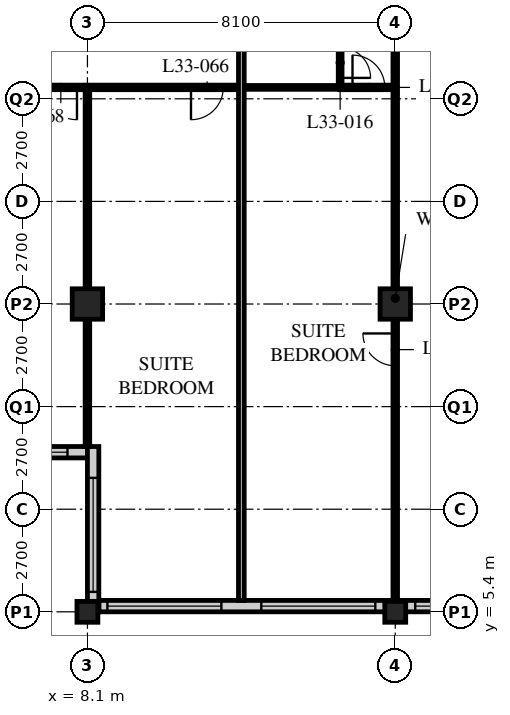
"""IFC4 building model, lengths in metres.
Left out: names, types, materials, properties, quantities, classifications, styles, units other than length and angle.
Written with IfcOpenShell. Run it as: python <this file> out.ifc"""

import sys

from ifc_helpers import new_model, si_unit, direction, frame, frame_2d, origin, origin_2d, place, context, subcontext, project, spatial, rectangle, hollow_rectangle, extrude, element, fill, save


model = new_model("IFC4")
c1 = context("Model", 3, precision=1e-05, world=origin(), true_north=direction((0.0, 1.0)))
c2 = subcontext(c1, "Body", "Model", "MODEL_VIEW")
j1 = project(units=[si_unit("LENGTHUNIT", "METRE"), si_unit("PLANEANGLEUNIT", "RADIAN")], contexts=[c1])
p1 = place(None, origin())
s1 = spatial("IfcSite", under=j1, at=p1, CompositionType="ELEMENT")
p2 = place(p1, origin())
s2 = spatial("IfcBuilding", under=s1, at=p2, CompositionType="ELEMENT")
p3 = place(p2, frame((0.0, 0.0, 130.6)))
s3 = spatial("IfcBuildingStorey", under=s2, at=p3, CompositionType="ELEMENT", Elevation=130.6)
p4 = place(p3, frame((8.1, 5.4, 0.0), z_axis=(0.0, 0.0, 1.0), x_axis=(1.0, 0.0, 0.0)))
e1 = element("IfcColumn", 1, at=p4, inside=s3, PredefinedType="COLUMN", context=c2, shape_type="SweptSolid", body=[
    extrude(hollow_rectangle(XDim=0.55, YDim=0.55, WallThickness=0.04, at=origin_2d()), origin(), (0.0, 0.0, 1.0), 3.4),
])
p5 = place(p3, frame((8.1, 13.5, 0.0), z_axis=(0.0, 0.0, 1.0), x_axis=(1.0, 0.0, 0.0)))
e2 = element("IfcColumn", 2, at=p5, inside=s3, PredefinedType="COLUMN", context=c2, shape_type="SweptSolid", body=[
    extrude(hollow_rectangle(XDim=0.8, YDim=0.8, WallThickness=0.08, at=origin_2d()), origin(), (0.0, 0.0, 1.0), 3.4),
])
p6 = place(p3, frame((16.2, 5.4, 0.0), z_axis=(0.0, 0.0, 1.0), x_axis=(1.0, 0.0, 0.0)))
e3 = element("IfcColumn", 3, at=p6, inside=s3, PredefinedType="COLUMN", context=c2, shape_type="SweptSolid", body=[
    extrude(hollow_rectangle(XDim=0.55, YDim=0.55, WallThickness=0.04, at=origin_2d()), origin(), (0.0, 0.0, 1.0), 3.4),
])
p7 = place(p3, frame((16.2, 13.5, 0.0), z_axis=(0.0, 0.0, 1.0), x_axis=(1.0, 0.0, 0.0)))
e4 = element("IfcColumn", 4, at=p7, inside=s3, PredefinedType="COLUMN", context=c2, shape_type="SweptSolid", body=[
    extrude(hollow_rectangle(XDim=0.8, YDim=0.8, WallThickness=0.08, at=origin_2d()), origin(), (0.0, 0.0, 1.0), 3.4),
])
p8 = place(p3, frame((8.4, 5.55, 0.0), z_axis=(0.0, 0.0, 1.0), x_axis=(1.0, 0.0, 0.0)))
e5 = element("IfcWall", 5, at=p8, inside=s3, PredefinedType="SOLIDWALL", context=c2, shape_type="SweptSolid", body=[
    extrude(rectangle(XDim=40.2, YDim=0.3, at=frame_2d((20.1, 0.0))), origin(), (0.0, 0.0, 1.0), 3.19),
])
p9 = place(p8, frame((0.225, 0.0, 0.9)))
e6 = element("IfcOpeningElement", 6, at=p9, cuts=e5, PredefinedType="OPENING", context=c2, shape_type="SweptSolid", body=[
    extrude(rectangle(XDim=3.0, YDim=2.0, at=frame_2d((1.5, 1.0))), frame((0.0, 0.16, 0.0), z_axis=(0.0, -1.0, 0.0), x_axis=(1.0, 0.0, 0.0)), (0.0, 0.0, 1.0), 0.32),
])
p10 = place(p8, frame((4.275, 0.0, 0.9)))
e7 = element("IfcOpeningElement", 7, at=p10, cuts=e5, PredefinedType="OPENING", context=c2, shape_type="SweptSolid", body=[
    extrude(rectangle(XDim=3.0, YDim=2.0, at=frame_2d((1.5, 1.0))), frame((0.0, 0.16, 0.0), z_axis=(0.0, -1.0, 0.0), x_axis=(1.0, 0.0, 0.0)), (0.0, 0.0, 1.0), 0.32),
])
p11 = place(p8, frame((8.325, 0.0, 0.9)))
e8 = element("IfcOpeningElement", 8, at=p11, cuts=e5, PredefinedType="OPENING", context=c2, shape_type="SweptSolid", body=[
    extrude(rectangle(XDim=3.0, YDim=2.0, at=frame_2d((1.5, 1.0))), frame((0.0, 0.16, 0.0), z_axis=(0.0, -1.0, 0.0), x_axis=(1.0, 0.0, 0.0)), (0.0, 0.0, 1.0), 0.32),
])
p12 = place(p8, frame((12.375, 0.0, 0.9)))
e9 = element("IfcOpeningElement", 9, at=p12, cuts=e5, PredefinedType="OPENING", context=c2, shape_type="SweptSolid", body=[
    extrude(rectangle(XDim=3.0, YDim=2.0, at=frame_2d((1.5, 1.0))), frame((0.0, 0.16, 0.0), z_axis=(0.0, -1.0, 0.0), x_axis=(1.0, 0.0, 0.0)), (0.0, 0.0, 1.0), 0.32),
])
p13 = place(p8, frame((16.425, 0.0, 0.9)))
e10 = element("IfcOpeningElement", 10, at=p13, cuts=e5, PredefinedType="OPENING", context=c2, shape_type="SweptSolid", body=[
    extrude(rectangle(XDim=3.0, YDim=2.0, at=frame_2d((1.5, 1.0))), frame((0.0, 0.16, 0.0), z_axis=(0.0, -1.0, 0.0), x_axis=(1.0, 0.0, 0.0)), (0.0, 0.0, 1.0), 0.32),
])
p14 = place(p8, frame((20.475, 0.0, 0.9)))
e11 = element("IfcOpeningElement", 11, at=p14, cuts=e5, PredefinedType="OPENING", context=c2, shape_type="SweptSolid", body=[
    extrude(rectangle(XDim=3.0, YDim=2.0, at=frame_2d((1.5, 1.0))), frame((0.0, 0.16, 0.0), z_axis=(0.0, -1.0, 0.0), x_axis=(1.0, 0.0, 0.0)), (0.0, 0.0, 1.0), 0.32),
])
p15 = place(p8, frame((24.525, 0.0, 0.9)))
e12 = element("IfcOpeningElement", 12, at=p15, cuts=e5, PredefinedType="OPENING", context=c2, shape_type="SweptSolid", body=[
    extrude(rectangle(XDim=3.0, YDim=2.0, at=frame_2d((1.5, 1.0))), frame((0.0, 0.16, 0.0), z_axis=(0.0, -1.0, 0.0), x_axis=(1.0, 0.0, 0.0)), (0.0, 0.0, 1.0), 0.32),
])
p16 = place(p8, frame((28.575, 0.0, 0.9)))
e13 = element("IfcOpeningElement", 13, at=p16, cuts=e5, PredefinedType="OPENING", context=c2, shape_type="SweptSolid", body=[
    extrude(rectangle(XDim=3.0, YDim=2.0, at=frame_2d((1.5, 1.0))), frame((0.0, 0.16, 0.0), z_axis=(0.0, -1.0, 0.0), x_axis=(1.0, 0.0, 0.0)), (0.0, 0.0, 1.0), 0.32),
])
p17 = place(p8, frame((32.625, 0.0, 0.9)))
e14 = element("IfcOpeningElement", 14, at=p17, cuts=e5, PredefinedType="OPENING", context=c2, shape_type="SweptSolid", body=[
    extrude(rectangle(XDim=3.0, YDim=2.0, at=frame_2d((1.5, 1.0))), frame((0.0, 0.16, 0.0), z_axis=(0.0, -1.0, 0.0), x_axis=(1.0, 0.0, 0.0)), (0.0, 0.0, 1.0), 0.32),
])
p18 = place(p8, frame((36.675, 0.0, 0.9)))
e15 = element("IfcOpeningElement", 15, at=p18, cuts=e5, PredefinedType="OPENING", context=c2, shape_type="SweptSolid", body=[
    extrude(rectangle(XDim=3.0, YDim=2.0, at=frame_2d((1.5, 1.0))), frame((0.0, 0.16, 0.0), z_axis=(0.0, -1.0, 0.0), x_axis=(1.0, 0.0, 0.0)), (0.0, 0.0, 1.0), 0.32),
])
p19 = place(p3, frame((4.35, 9.6, 0.0), z_axis=(0.0, 0.0, 1.0), x_axis=(1.0, 0.0, 0.0)))
e16 = element("IfcWall", 16, at=p19, inside=s3, PredefinedType="SOLIDWALL", context=c2, shape_type="SweptSolid", body=[
    extrude(rectangle(XDim=3.75, YDim=0.3, at=frame_2d((1.875, 0.0))), origin(), (0.0, 0.0, 1.0), 3.19),
])
p20 = place(p19, frame((0.225, 0.0, 0.9)))
e17 = element("IfcOpeningElement", 17, at=p20, cuts=e16, PredefinedType="OPENING", context=c2, shape_type="SweptSolid", body=[
    extrude(rectangle(XDim=3.0, YDim=1.5, at=frame_2d((1.5, 0.75))), frame((0.0, 0.16, 0.0), z_axis=(0.0, -1.0, 0.0), x_axis=(1.0, 0.0, 0.0)), (0.0, 0.0, 1.0), 0.32),
])
p21 = place(p3, frame((8.25, 9.75, 0.0), z_axis=(0.0, 0.0, 1.0), x_axis=(0.0, -1.0, 0.0)))
e18 = element("IfcWall", 18, at=p21, inside=s3, PredefinedType="SOLIDWALL", context=c2, shape_type="SweptSolid", body=[
    extrude(rectangle(XDim=4.35, YDim=0.3, at=frame_2d((2.175, 0.0))), origin(), (0.0, 0.0, 1.0), 3.19),
])
p22 = place(p21, frame((0.825, 0.0, 0.9)))
e19 = element("IfcOpeningElement", 19, at=p22, cuts=e18, PredefinedType="OPENING", context=c2, shape_type="SweptSolid", body=[
    extrude(rectangle(XDim=3.0, YDim=1.5, at=frame_2d((1.5, 0.75))), frame((0.0, 0.16, 0.0), z_axis=(0.0, -1.0, 0.0), x_axis=(1.0, 0.0, 0.0)), (0.0, 0.0, 1.0), 0.32),
])
p23 = place(p3, frame((12.15, 19.2, 0.0), z_axis=(0.0, 0.0, 1.0), x_axis=(1.0, 0.0, 0.0)))
e20 = element("IfcWall", 20, at=p23, inside=s3, PredefinedType="PARTITIONING", context=c2, shape_type="SweptSolid", body=[
    extrude(rectangle(XDim=2.6, YDim=0.1, at=frame_2d((1.3, 0.0))), origin(), (0.0, 0.0, 1.0), 3.19),
])
p24 = place(p3, frame((14.75, 21.6, 0.0), z_axis=(0.0, 0.0, 1.0), x_axis=(0.0, -1.0, 0.0)))
e21 = element("IfcWall", 21, at=p24, inside=s3, PredefinedType="PARTITIONING", context=c2, shape_type="SweptSolid", body=[
    extrude(rectangle(XDim=2.4, YDim=0.1, at=frame_2d((1.2, 0.0))), origin(), (0.0, 0.0, 1.0), 3.19),
])
p25 = place(p24, frame((1.35, 0.0, 0.0)))
e22 = element("IfcOpeningElement", 22, at=p25, cuts=e21, PredefinedType="OPENING", context=c2, shape_type="SweptSolid", body=[
    extrude(rectangle(XDim=0.8, YDim=2.1, at=frame_2d((0.4, 1.05))), frame((0.0, 0.06, 0.0), z_axis=(0.0, -1.0, 0.0), x_axis=(1.0, 0.0, 0.0)), (0.0, 0.0, 1.0), 0.12),
])
p26 = place(p3, frame((16.2, 21.6, 0.0), z_axis=(0.0, 0.0, 1.0), x_axis=(0.0, -1.0, 0.0)))
e23 = element("IfcWall", 23, at=p26, inside=s3, PredefinedType="PARTITIONING", context=c2, shape_type="SweptSolid", body=[
    extrude(rectangle(XDim=15.9, YDim=0.12, at=frame_2d((7.95, 0.0))), origin(), (0.0, 0.0, 1.0), 2.578),
])
p27 = place(p26, frame((8.875, 0.0, 0.0)))
e24 = element("IfcOpeningElement", 24, at=p27, cuts=e23, PredefinedType="OPENING", context=c2, shape_type="SweptSolid", body=[
    extrude(rectangle(XDim=0.85, YDim=2.1, at=frame_2d((0.425, 1.05))), frame((0.0, 0.07, 0.0), z_axis=(0.0, -1.0, 0.0), x_axis=(1.0, 0.0, 0.0)), (0.0, 0.0, 1.0), 0.14),
])
p28 = place(p3, frame((4.1, 19.2, 0.0), z_axis=(0.0, 0.0, 1.0), x_axis=(1.0, 0.0, 0.0)))
e25 = element("IfcWall", 25, at=p28, inside=s3, PredefinedType="PARTITIONING", context=c2, shape_type="SweptSolid", body=[
    extrude(rectangle(XDim=8.05, YDim=0.12, at=frame_2d((4.025, 0.0))), origin(), (0.0, 0.0, 1.0), 3.19),
])
p29 = place(p28, frame((6.725, 0.0, 0.0)))
e26 = element("IfcOpeningElement", 26, at=p29, cuts=e25, PredefinedType="OPENING", context=c2, shape_type="SweptSolid", body=[
    extrude(rectangle(XDim=0.85, YDim=2.1, at=frame_2d((0.425, 1.05))), frame((0.0, 0.07, 0.0), z_axis=(0.0, -1.0, 0.0), x_axis=(1.0, 0.0, 0.0)), (0.0, 0.0, 1.0), 0.14),
])
p30 = place(p28, frame((2.875, 0.0, 0.0)))
e27 = element("IfcOpeningElement", 27, at=p30, cuts=e25, PredefinedType="OPENING", context=c2, shape_type="SweptSolid", body=[
    extrude(rectangle(XDim=0.85, YDim=2.1, at=frame_2d((0.425, 1.05))), frame((0.0, 0.07, 0.0), z_axis=(0.0, -1.0, 0.0), x_axis=(1.0, 0.0, 0.0)), (0.0, 0.0, 1.0), 0.14),
])
p31 = place(p3, frame((8.1, 19.2, 0.0), z_axis=(0.0, 0.0, 1.0), x_axis=(0.0, -1.0, 0.0)))
e28 = element("IfcWall", 28, at=p31, inside=s3, PredefinedType="PARTITIONING", context=c2, shape_type="SweptSolid", body=[
    extrude(rectangle(XDim=9.45, YDim=0.12, at=frame_2d((4.725, 0.0))), origin(), (0.0, 0.0, 1.0), 2.578),
])
p32 = place(p3, frame((12.15, 21.6, 0.0), z_axis=(0.0, 0.0, 1.0), x_axis=(0.0, -1.0, 0.0)))
e29 = element("IfcWall", 29, at=p32, inside=s3, PredefinedType="PARTITIONING", context=c2, shape_type="SweptSolid", body=[
    extrude(rectangle(XDim=15.9, YDim=0.15, at=frame_2d((7.95, 0.0))), origin(), (0.0, 0.0, 1.0), 3.19),
])
p33 = place(p3, frame((16.2, 19.2, 0.0), z_axis=(0.0, 0.0, 1.0), x_axis=(-1.0, 0.0, 0.0)))
e30 = element("IfcWall", 30, at=p33, inside=s3, PredefinedType="PARTITIONING", context=c2, shape_type="SweptSolid", body=[
    extrude(rectangle(XDim=1.46, YDim=0.12, at=frame_2d((0.73, 0.0))), origin(), (0.0, 0.0, 1.0), 3.19),
])
p34 = place(p33, frame((0.275, 0.0, 0.0)))
e31 = element("IfcOpeningElement", 31, at=p34, cuts=e30, PredefinedType="OPENING", context=c2, shape_type="SweptSolid", body=[
    extrude(rectangle(XDim=0.85, YDim=2.1, at=frame_2d((0.425, 1.05))), frame((0.0, 0.07, 0.0), z_axis=(0.0, -1.0, 0.0), x_axis=(1.0, 0.0, 0.0)), (0.0, 0.0, 1.0), 0.14),
])
p35 = place(p9, origin())
e32 = element("IfcWindow", 32, at=p35, inside=s3, PartitioningType="SINGLE_PANEL", PredefinedType="WINDOW", context=c2, shape_type="SweptSolid", body=[
    extrude(rectangle(XDim=3.0, YDim=2.0, at=frame_2d((1.5, 1.0))), frame((0.0, 0.03, 0.0), z_axis=(0.0, -1.0, 0.0), x_axis=(1.0, 0.0, 0.0)), (0.0, 0.0, 1.0), 0.06),
])
fill(e6, e32)
p36 = place(p10, origin())
e33 = element("IfcWindow", 33, at=p36, inside=s3, PartitioningType="SINGLE_PANEL", PredefinedType="WINDOW", context=c2, shape_type="SweptSolid", body=[
    extrude(rectangle(XDim=3.0, YDim=2.0, at=frame_2d((1.5, 1.0))), frame((0.0, 0.03, 0.0), z_axis=(0.0, -1.0, 0.0), x_axis=(1.0, 0.0, 0.0)), (0.0, 0.0, 1.0), 0.06),
])
fill(e7, e33)
p37 = place(p11, origin())
e34 = element("IfcWindow", 34, at=p37, inside=s3, PartitioningType="SINGLE_PANEL", PredefinedType="WINDOW", context=c2, shape_type="SweptSolid", body=[
    extrude(rectangle(XDim=3.0, YDim=2.0, at=frame_2d((1.5, 1.0))), frame((0.0, 0.03, 0.0), z_axis=(0.0, -1.0, 0.0), x_axis=(1.0, 0.0, 0.0)), (0.0, 0.0, 1.0), 0.06),
])
fill(e8, e34)
p38 = place(p20, origin())
e35 = element("IfcWindow", 35, at=p38, inside=s3, PartitioningType="SINGLE_PANEL", PredefinedType="WINDOW", context=c2, shape_type="SweptSolid", body=[
    extrude(rectangle(XDim=3.0, YDim=1.5, at=frame_2d((1.5, 0.75))), frame((0.0, 0.03, 0.0), z_axis=(0.0, -1.0, 0.0), x_axis=(1.0, 0.0, 0.0)), (0.0, 0.0, 1.0), 0.06),
])
fill(e17, e35)
p39 = place(p22, origin())
e36 = element("IfcWindow", 36, at=p39, inside=s3, PartitioningType="SINGLE_PANEL", PredefinedType="WINDOW", context=c2, shape_type="SweptSolid", body=[
    extrude(rectangle(XDim=3.0, YDim=1.5, at=frame_2d((1.5, 0.75))), frame((0.0, 0.03, 0.0), z_axis=(0.0, -1.0, 0.0), x_axis=(1.0, 0.0, 0.0)), (0.0, 0.0, 1.0), 0.06),
])
fill(e19, e36)
p40 = place(p25, origin())
e37 = element("IfcDoor", 37, at=p40, inside=s3, OperationType="SINGLE_SWING_RIGHT", PredefinedType="DOOR", context=c2, shape_type="SweptSolid", body=[
    extrude(rectangle(XDim=0.8, YDim=2.1, at=frame_2d((0.4, 1.05))), frame((0.0, 0.025, 0.0), z_axis=(0.0, -1.0, 0.0), x_axis=(1.0, 0.0, 0.0)), (0.0, 0.0, 1.0), 0.05),
])
fill(e22, e37)
p41 = place(p27, origin())
e38 = element("IfcDoor", 38, at=p41, inside=s3, OperationType="SINGLE_SWING_RIGHT", PredefinedType="DOOR", context=c2, shape_type="SweptSolid", body=[
    extrude(rectangle(XDim=0.85, YDim=2.1, at=frame_2d((0.425, 1.05))), frame((0.0, 0.025, 0.0), z_axis=(0.0, -1.0, 0.0), x_axis=(1.0, 0.0, 0.0)), (0.0, 0.0, 1.0), 0.05),
])
fill(e24, e38)
p42 = place(p29, origin())
e39 = element("IfcDoor", 39, at=p42, inside=s3, OperationType="SINGLE_SWING_RIGHT", PredefinedType="DOOR", context=c2, shape_type="SweptSolid", body=[
    extrude(rectangle(XDim=0.85, YDim=2.1, at=frame_2d((0.425, 1.05))), frame((0.0, 0.025, 0.0), z_axis=(0.0, -1.0, 0.0), x_axis=(1.0, 0.0, 0.0)), (0.0, 0.0, 1.0), 0.05),
])
fill(e26, e39)
p43 = place(p30, origin())
e40 = element("IfcDoor", 40, at=p43, inside=s3, OperationType="SINGLE_SWING_LEFT", PredefinedType="DOOR", context=c2, shape_type="SweptSolid", body=[
    extrude(rectangle(XDim=0.85, YDim=2.1, at=frame_2d((0.425, 1.05))), frame((0.0, 0.025, 0.0), z_axis=(0.0, -1.0, 0.0), x_axis=(1.0, 0.0, 0.0)), (0.0, 0.0, 1.0), 0.05),
])
fill(e27, e40)
p44 = place(p34, origin())
e41 = element("IfcDoor", 41, at=p44, inside=s3, OperationType="SINGLE_SWING_LEFT", PredefinedType="DOOR", context=c2, shape_type="SweptSolid", body=[
    extrude(rectangle(XDim=0.85, YDim=2.1, at=frame_2d((0.425, 1.05))), frame((0.0, 0.025, 0.0), z_axis=(0.0, -1.0, 0.0), x_axis=(1.0, 0.0, 0.0)), (0.0, 0.0, 1.0), 0.05),
])
fill(e31, e41)
save(model, sys.argv[1])
